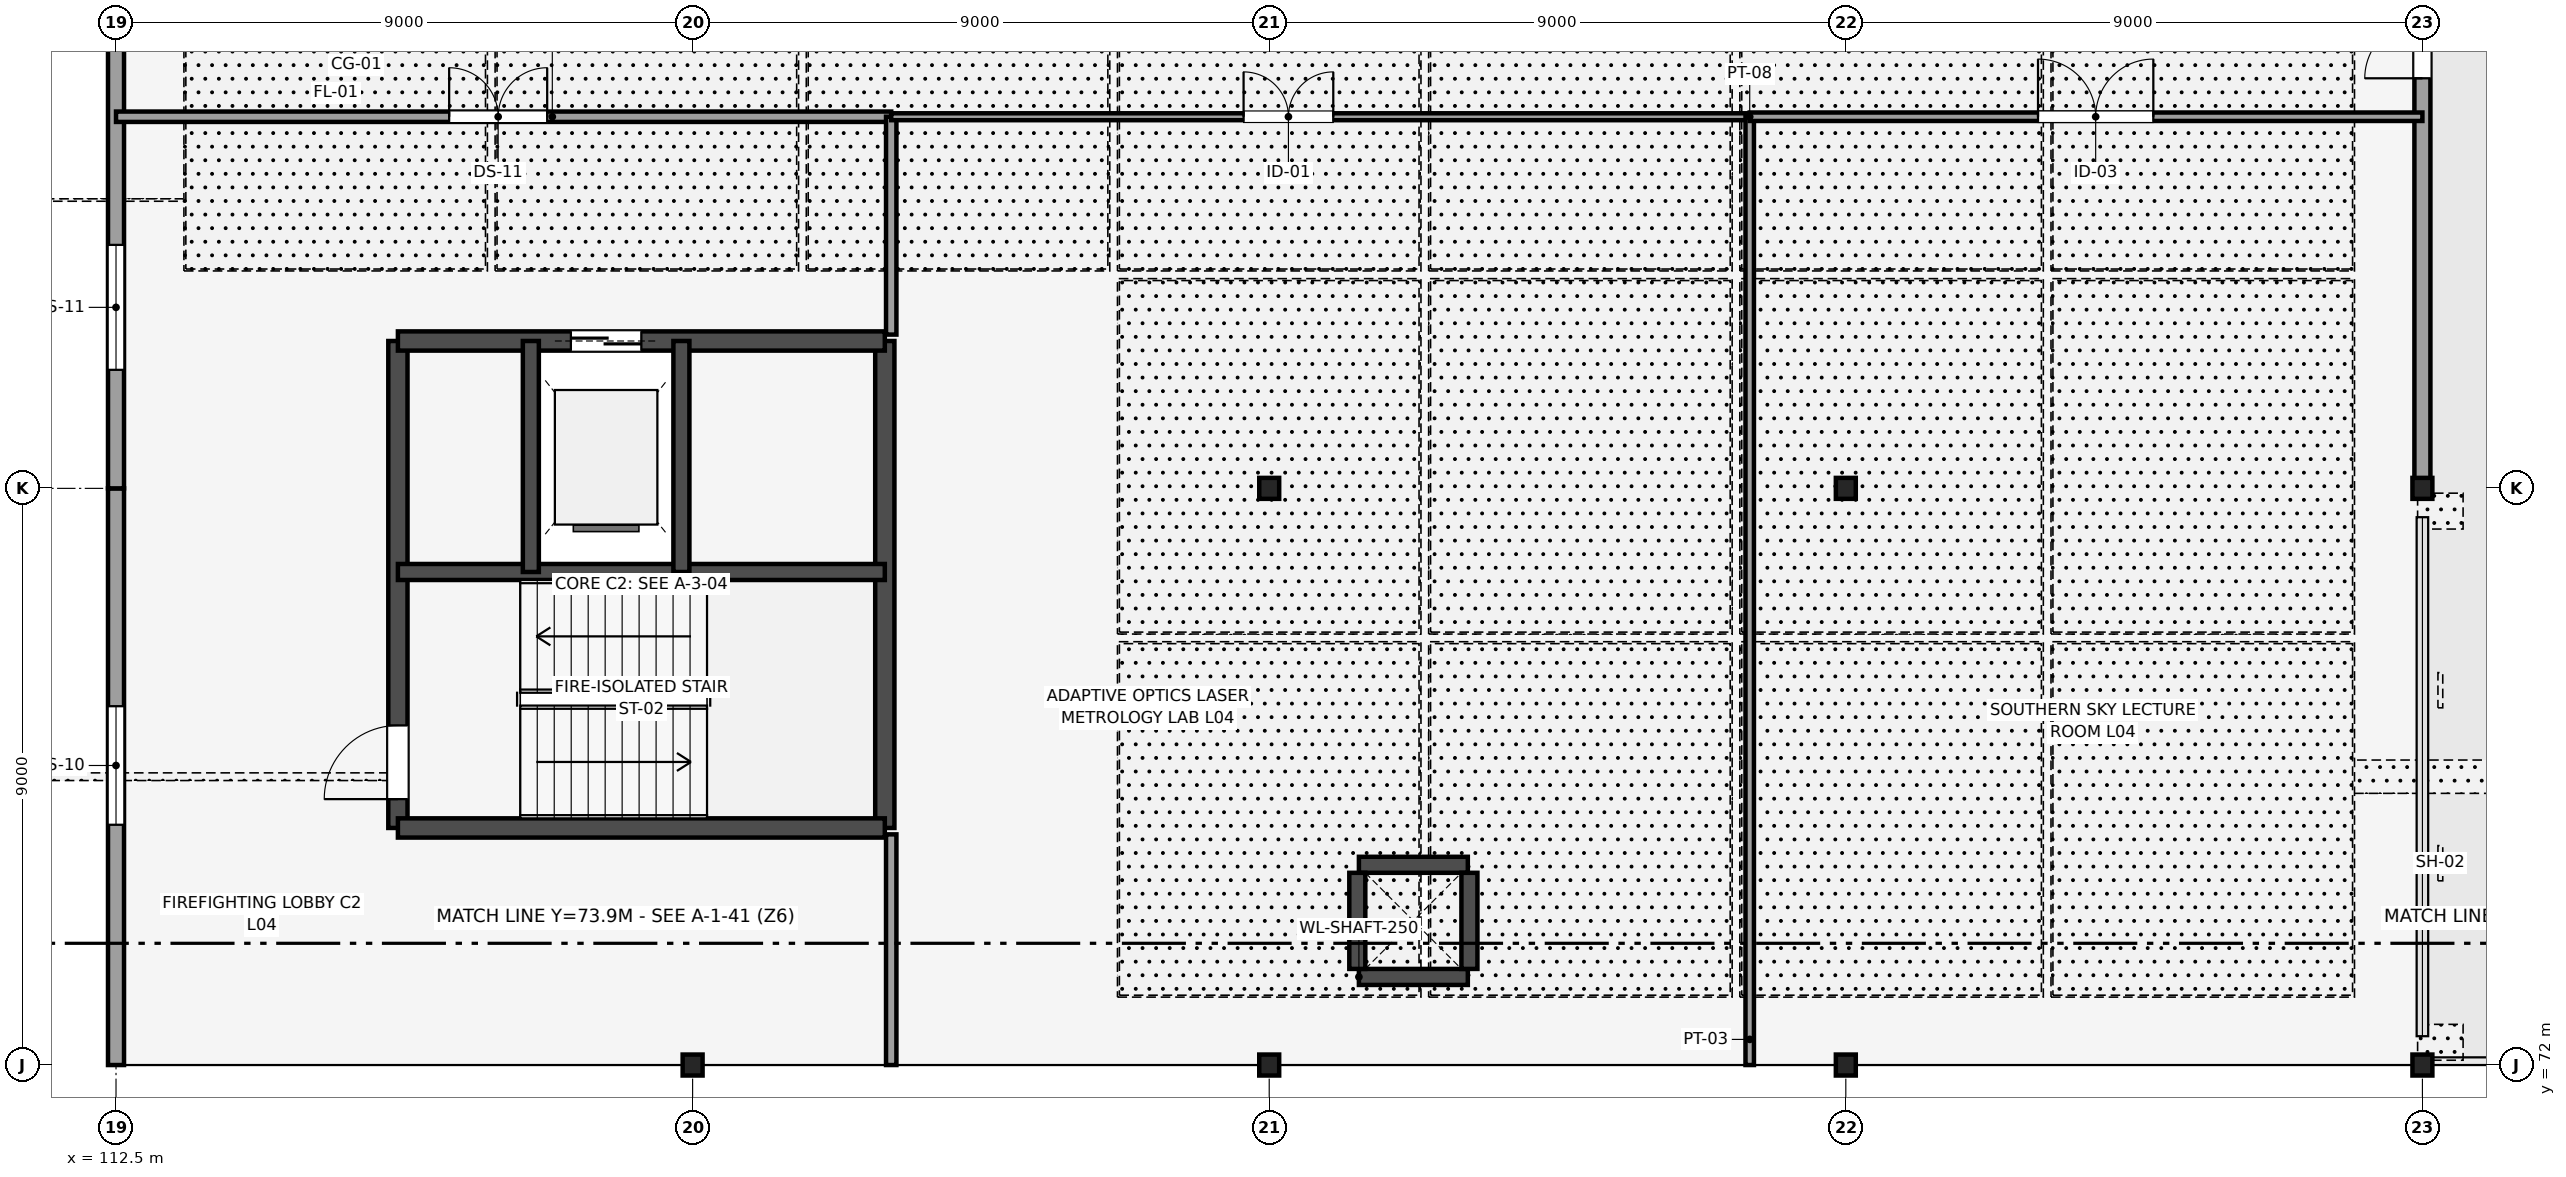
"""IFC4 building model, lengths in metres.
Left out: names, types, materials, properties, quantities, classifications, styles, units other than length and angle.
Written with IfcOpenShell. Run it as: python <this file> out.ifc"""

import sys

from ifc_helpers import new_model, si_unit, direction, frame, frame_2d, origin, origin_2d, place, context, subcontext, project, spatial, rectangle, i_section, extrude, element, fill, save


model = new_model("IFC4")
c1 = context("Model", 3, precision=1e-05, world=origin(), true_north=direction((0.0, 1.0)))
c2 = subcontext(c1, "Body", "Model", "MODEL_VIEW")
j1 = project(units=[si_unit("LENGTHUNIT", "METRE"), si_unit("PLANEANGLEUNIT", "RADIAN")], contexts=[c1])
p1 = place(None, origin())
s1 = spatial("IfcSite", under=j1, at=p1, CompositionType="ELEMENT")
p2 = place(p1, origin())
s2 = spatial("IfcBuilding", under=s1, at=p2, CompositionType="ELEMENT")
p3 = place(p2, frame((0.0, 0.0, 18.9)))
s3 = spatial("IfcBuildingStorey", under=s2, at=p3, CompositionType="ELEMENT", Elevation=18.9)
for number, where, z_axis, x_axis in (
    (1, (121.5, 72.0, 0.0), (0.0, 0.0, 1.0), (1.0, 0.0, 0.0)),
    (2, (130.5, 72.0, 0.0), (0.0, 0.0, 1.0), (1.0, 0.0, 0.0)),
    (3, (130.5, 81.0, 0.0), (0.0, 0.0, 1.0), (1.0, 0.0, 0.0)),
    (4, (139.5, 72.0, 0.0), (0.0, 0.0, 1.0), (1.0, 0.0, 0.0)),
    (5, (139.5, 81.0, 0.0), (0.0, 0.0, 1.0), (1.0, 0.0, 0.0)),
    (6, (148.5, 72.0, 0.0), (0.0, 0.0, 1.0), (1.0, 0.0, 0.0)),
    (7, (148.5, 81.0, 0.0), (0.0, 0.0, 1.0), (1.0, 0.0, 0.0)),
):
    element("IfcColumn", number, at=place(p3, frame(where, z_axis=z_axis, x_axis=x_axis)), inside=s3, PredefinedType="COLUMN", context=c2, shape_type="SweptSolid", body=[
        extrude(i_section(OverallWidth=0.311, OverallDepth=0.327, WebThickness=0.016, FlangeThickness=0.025, FilletRadius=0.017, at=origin_2d()), origin(), (0.0, 0.0, 1.0), 4.5),
    ])
p4 = place(p3, frame((116.9, 75.7, 0.0), z_axis=(0.0, 0.0, 1.0), x_axis=(0.0, 1.0, 0.0)))
e8 = element("IfcWall", 8, at=p4, inside=s3, PredefinedType="SHEAR", context=c2, shape_type="SweptSolid", body=[
    extrude(rectangle(XDim=7.6, YDim=0.3, at=frame_2d((3.8, 0.0))), origin(), (0.0, 0.0, 1.0), 4.5),
])
p5 = place(p4, frame((0.45, 0.0, 0.0)))
e9 = element("IfcOpeningElement", 9, at=p5, cuts=e8, PredefinedType="OPENING", context=c2, shape_type="SweptSolid", body=[
    extrude(rectangle(XDim=1.15, YDim=2.15, at=frame_2d((0.575, 1.075))), frame((0.0, 0.16, 0.0), z_axis=(0.0, -1.0, 0.0), x_axis=(1.0, 0.0, 0.0)), (0.0, 0.0, 1.0), 0.32),
])
for number, where, z_axis, x_axis in (
    (10, (124.5, 75.7, 0.0), (0.0, 0.0, 1.0), (0.0, 1.0, 0.0)),
    (11, (116.9, 75.7, 0.0), (0.0, 0.0, 1.0), (1.0, 0.0, 0.0)),
):
    element("IfcWall", number, at=place(p3, frame(where, z_axis=z_axis, x_axis=x_axis)), inside=s3, PredefinedType="SHEAR", context=c2, shape_type="SweptSolid", body=[
        extrude(rectangle(XDim=7.6, YDim=0.3, at=frame_2d((3.8, 0.0))), origin(), (0.0, 0.0, 1.0), 4.5),
    ])
p6 = place(p3, frame((116.9, 83.3, 0.0), z_axis=(0.0, 0.0, 1.0), x_axis=(1.0, 0.0, 0.0)))
e12 = element("IfcWall", 12, at=p6, inside=s3, PredefinedType="SHEAR", context=c2, shape_type="SweptSolid", body=[
    extrude(rectangle(XDim=7.6, YDim=0.3, at=frame_2d((3.8, 0.0))), origin(), (0.0, 0.0, 1.0), 4.5),
])
p7 = place(p6, frame((2.7, 0.0, 0.0)))
e13 = element("IfcOpeningElement", 13, at=p7, cuts=e12, PredefinedType="OPENING", context=c2, shape_type="SweptSolid", body=[
    extrude(rectangle(XDim=1.1, YDim=2.2, at=frame_2d((0.55, 1.1))), frame((0.0, 0.16, 0.0), z_axis=(0.0, -1.0, 0.0), x_axis=(1.0, 0.0, 0.0)), (0.0, 0.0, 1.0), 0.32),
])
p8 = place(p3, frame((116.9, 79.695, 0.0), z_axis=(0.0, 0.0, 1.0), x_axis=(1.0, 0.0, 0.0)))
e14 = element("IfcWall", 14, at=p8, inside=s3, PredefinedType="SHEAR", context=c2, shape_type="SweptSolid", body=[
    extrude(rectangle(XDim=7.6, YDim=0.25, at=frame_2d((3.8, 0.0))), origin(), (0.0, 0.0, 1.0), 4.5),
])
for number, where, z_axis, x_axis in (
    (15, (118.975, 79.695, 0.0), (0.0, 0.0, 1.0), (0.0, 1.0, 0.0)),
    (16, (121.325, 79.695, 0.0), (0.0, 0.0, 1.0), (0.0, 1.0, 0.0)),
):
    element("IfcWall", number, at=place(p3, frame(where, z_axis=z_axis, x_axis=x_axis)), inside=s3, PredefinedType="SHEAR", context=c2, shape_type="SweptSolid", body=[
        extrude(rectangle(XDim=3.605, YDim=0.25, at=frame_2d((1.802, 0.0))), origin(), (0.0, 0.0, 1.0), 4.5),
    ])
for number, where, z_axis, x_axis in (
    (17, (131.9, 73.375, 0.0), (0.0, 0.0, 1.0), (1.0, 0.0, 0.0)),
    (18, (131.9, 75.125, 0.0), (0.0, 0.0, 1.0), (1.0, 0.0, 0.0)),
):
    element("IfcWall", number, at=place(p3, frame(where, z_axis=z_axis, x_axis=x_axis)), inside=s3, PredefinedType="SHEAR", context=c2, shape_type="SweptSolid", body=[
        extrude(rectangle(XDim=1.7, YDim=0.25, at=frame_2d((0.85, 0.0))), origin(), (0.0, 0.0, 1.0), 3.77),
    ])
for number, where, z_axis, x_axis in (
    (19, (131.875, 73.5, 0.0), (0.0, 0.0, 1.0), (0.0, 1.0, 0.0)),
    (20, (133.625, 73.5, 0.0), (0.0, 0.0, 1.0), (0.0, 1.0, 0.0)),
):
    element("IfcWall", number, at=place(p3, frame(where, z_axis=z_axis, x_axis=x_axis)), inside=s3, PredefinedType="SHEAR", context=c2, shape_type="SweptSolid", body=[
        extrude(rectangle(XDim=1.5, YDim=0.25, at=frame_2d((0.75, 0.0))), origin(), (0.0, 0.0, 1.0), 3.77),
    ])
p9 = place(p3, frame((112.5, 81.0, 0.0), z_axis=(0.0, 0.0, 1.0), x_axis=(0.0, -1.0, 0.0)))
e21 = element("IfcWall", 21, at=p9, inside=s3, PredefinedType="STANDARD", context=c2, shape_type="SweptSolid", body=[
    extrude(rectangle(XDim=9.0, YDim=0.25, at=frame_2d((4.5, 0.0))), origin(), (0.0, 0.0, 1.0), 4.32),
])
p10 = place(p9, frame((3.4, 0.0, 1.0)))
e22 = element("IfcOpeningElement", 22, at=p10, cuts=e21, PredefinedType="OPENING", context=c2, shape_type="SweptSolid", body=[
    extrude(rectangle(XDim=1.85, YDim=1.65, at=frame_2d((0.925, 0.825))), frame((0.0, 0.135, 0.0), z_axis=(0.0, -1.0, 0.0), x_axis=(1.0, 0.0, 0.0)), (0.0, 0.0, 1.0), 0.27),
])
p11 = place(p3, frame((148.5, 81.0, 0.0), z_axis=(0.0, 0.0, 1.0), x_axis=(0.0, 1.0, 0.0)))
e23 = element("IfcWall", 23, at=p11, inside=s3, PredefinedType="STANDARD", context=c2, shape_type="SweptSolid", body=[
    extrude(rectangle(XDim=9.0, YDim=0.25, at=frame_2d((4.5, 0.0))), origin(), (0.0, 0.0, 1.0), 3.846),
])
p12 = place(p11, frame((6.4, 0.0, 0.0)))
e24 = element("IfcOpeningElement", 24, at=p12, cuts=e23, PredefinedType="OPENING", context=c2, shape_type="SweptSolid", body=[
    extrude(rectangle(XDim=1.8, YDim=2.3, at=frame_2d((0.9, 1.15))), frame((0.0, 0.135, 0.0), z_axis=(0.0, -1.0, 0.0), x_axis=(1.0, 0.0, 0.0)), (0.0, 0.0, 1.0), 0.27),
])
p13 = place(p3, frame((112.5, 90.0, 0.0), z_axis=(0.0, 0.0, 1.0), x_axis=(0.0, -1.0, 0.0)))
e25 = element("IfcWall", 25, at=p13, inside=s3, PredefinedType="STANDARD", context=c2, shape_type="SweptSolid", body=[
    extrude(rectangle(XDim=9.0, YDim=0.25, at=frame_2d((4.5, 0.0))), origin(), (0.0, 0.0, 1.0), 4.32),
])
p14 = place(p13, frame((5.2, 0.0, 1.0)))
e26 = element("IfcOpeningElement", 26, at=p14, cuts=e25, PredefinedType="OPENING", context=c2, shape_type="SweptSolid", body=[
    extrude(rectangle(XDim=1.95, YDim=1.65, at=frame_2d((0.975, 0.825))), frame((0.0, 0.135, 0.0), z_axis=(0.0, -1.0, 0.0), x_axis=(1.0, 0.0, 0.0)), (0.0, 0.0, 1.0), 0.27),
])
p15 = place(p3, frame((112.5, 86.8, 0.0), z_axis=(0.0, 0.0, 1.0), x_axis=(1.0, 0.0, 0.0)))
e27 = element("IfcWall", 27, at=p15, inside=s3, PredefinedType="PARTITIONING", context=c2, shape_type="SweptSolid", body=[
    extrude(rectangle(XDim=12.1, YDim=0.162, at=frame_2d((6.05, 0.0))), origin(), (0.0, 0.0, 1.0), 4.32),
])
p16 = place(p15, frame((5.2, 0.0, 0.0)))
e28 = element("IfcOpeningElement", 28, at=p16, cuts=e27, PredefinedType="OPENING", context=c2, shape_type="SweptSolid", body=[
    extrude(rectangle(XDim=1.53, YDim=2.175, at=frame_2d((0.765, 1.087))), frame((0.0, 0.091, 0.0), z_axis=(0.0, -1.0, 0.0), x_axis=(1.0, 0.0, 0.0)), (0.0, 0.0, 1.0), 0.182),
])
p17 = place(p3, frame((124.6, 83.4, 0.0), z_axis=(0.0, 0.0, 1.0), x_axis=(0.0, 1.0, 0.0)))
e29 = element("IfcWall", 29, at=p17, inside=s3, PredefinedType="PARTITIONING", context=c2, shape_type="SweptSolid", body=[
    extrude(rectangle(XDim=3.4, YDim=0.162, at=frame_2d((1.7, 0.0))), origin(), (0.0, 0.0, 1.0), 4.32),
])
p18 = place(p3, frame((124.6, 72.0, 0.0), z_axis=(0.0, 0.0, 1.0), x_axis=(0.0, 1.0, 0.0)))
e30 = element("IfcWall", 30, at=p18, inside=s3, PredefinedType="PARTITIONING", context=c2, shape_type="SweptSolid", body=[
    extrude(rectangle(XDim=3.6, YDim=0.162, at=frame_2d((1.8, 0.0))), origin(), (0.0, 0.0, 1.0), 4.32),
])
p19 = place(p3, frame((124.6, 86.8, 0.0), z_axis=(0.0, 0.0, 1.0), x_axis=(1.0, 0.0, 0.0)))
e31 = element("IfcWall", 31, at=p19, inside=s3, PredefinedType="PARTITIONING", context=c2, shape_type="SweptSolid", body=[
    extrude(rectangle(XDim=13.4, YDim=0.108, at=frame_2d((6.7, 0.0))), origin(), (0.0, 0.0, 1.0), 4.32),
])
p20 = place(p19, frame((5.5, 0.0, 0.0)))
e32 = element("IfcOpeningElement", 32, at=p20, cuts=e31, PredefinedType="OPENING", context=c2, shape_type="SweptSolid", body=[
    extrude(rectangle(XDim=1.4, YDim=2.2, at=frame_2d((0.7, 1.1))), frame((0.0, 0.064, 0.0), z_axis=(0.0, -1.0, 0.0), x_axis=(1.0, 0.0, 0.0)), (0.0, 0.0, 1.0), 0.128),
])
p21 = place(p3, frame((138.0, 72.0, 0.0), z_axis=(0.0, 0.0, 1.0), x_axis=(0.0, 1.0, 0.0)))
e33 = element("IfcWall", 33, at=p21, inside=s3, PredefinedType="PARTITIONING", context=c2, shape_type="SweptSolid", body=[
    extrude(rectangle(XDim=14.8, YDim=0.132, at=frame_2d((7.4, 0.0))), origin(), (0.0, 0.0, 1.0), 4.32),
])
p22 = place(p3, frame((138.0, 86.8, 0.0), z_axis=(0.0, 0.0, 1.0), x_axis=(1.0, 0.0, 0.0)))
e34 = element("IfcWall", 34, at=p22, inside=s3, PredefinedType="PARTITIONING", context=c2, shape_type="SweptSolid", body=[
    extrude(rectangle(XDim=10.5, YDim=0.132, at=frame_2d((5.25, 0.0))), origin(), (0.0, 0.0, 1.0), 4.32),
])
p23 = place(p22, frame((4.5, 0.0, 0.0)))
e35 = element("IfcOpeningElement", 35, at=p23, cuts=e34, PredefinedType="OPENING", context=c2, shape_type="SweptSolid", body=[
    extrude(rectangle(XDim=1.8, YDim=2.3, at=frame_2d((0.9, 1.15))), frame((0.0, 0.076, 0.0), z_axis=(0.0, -1.0, 0.0), x_axis=(1.0, 0.0, 0.0)), (0.0, 0.0, 1.0), 0.152),
])
p24 = place(p12, origin())
e36 = element("IfcDoor", 36, at=p24, inside=s3, OperationType="DOUBLE_DOOR_SINGLE_SWING", PredefinedType="DOOR", context=c2, shape_type="SweptSolid", body=[
    extrude(rectangle(XDim=1.8, YDim=2.3, at=frame_2d((0.9, 1.15))), frame((0.0, 0.025, 0.0), z_axis=(0.0, -1.0, 0.0), x_axis=(1.0, 0.0, 0.0)), (0.0, 0.0, 1.0), 0.05),
])
fill(e24, e36)
p25 = place(p10, origin())
e37 = element("IfcWindow", 37, at=p25, inside=s3, PartitioningType="SINGLE_PANEL", PredefinedType="WINDOW", context=c2, shape_type="SweptSolid", body=[
    extrude(rectangle(XDim=1.85, YDim=1.65, at=frame_2d((0.925, 0.825))), frame((0.0, 0.03, 0.0), z_axis=(0.0, -1.0, 0.0), x_axis=(1.0, 0.0, 0.0)), (0.0, 0.0, 1.0), 0.06),
])
fill(e22, e37)
p26 = place(p14, origin())
e38 = element("IfcWindow", 38, at=p26, inside=s3, PartitioningType="SINGLE_PANEL", PredefinedType="WINDOW", context=c2, shape_type="SweptSolid", body=[
    extrude(rectangle(XDim=1.95, YDim=1.65, at=frame_2d((0.975, 0.825))), frame((0.0, 0.03, 0.0), z_axis=(0.0, -1.0, 0.0), x_axis=(1.0, 0.0, 0.0)), (0.0, 0.0, 1.0), 0.06),
])
fill(e26, e38)
p27 = place(p5, origin())
e39 = element("IfcDoor", 39, at=p27, inside=s3, OperationType="SINGLE_SWING_LEFT", PredefinedType="DOOR", context=c2, shape_type="SweptSolid", body=[
    extrude(rectangle(XDim=1.15, YDim=2.15, at=frame_2d((0.575, 1.075))), frame((0.0, 0.025, 0.0), z_axis=(0.0, -1.0, 0.0), x_axis=(1.0, 0.0, 0.0)), (0.0, 0.0, 1.0), 0.05),
])
fill(e9, e39)
p28 = place(p7, origin())
e40 = element("IfcDoor", 40, at=p28, inside=s3, OperationType="DOUBLE_DOOR_SLIDING", PredefinedType="DOOR", context=c2, shape_type="SweptSolid", body=[
    extrude(rectangle(XDim=1.1, YDim=2.2, at=frame_2d((0.55, 1.1))), frame((0.0, 0.025, 0.0), z_axis=(0.0, -1.0, 0.0), x_axis=(1.0, 0.0, 0.0)), (0.0, 0.0, 1.0), 0.05),
])
fill(e13, e40)
p29 = place(p16, origin())
e41 = element("IfcDoor", 41, at=p29, inside=s3, OperationType="DOUBLE_DOOR_SINGLE_SWING", PredefinedType="DOOR", context=c2, shape_type="SweptSolid", body=[
    extrude(rectangle(XDim=1.53, YDim=2.175, at=frame_2d((0.765, 1.087))), frame((0.0, 0.025, 0.0), z_axis=(0.0, -1.0, 0.0), x_axis=(1.0, 0.0, 0.0)), (0.0, 0.0, 1.0), 0.05),
])
fill(e28, e41)
p30 = place(p20, origin())
e42 = element("IfcDoor", 42, at=p30, inside=s3, OperationType="DOUBLE_DOOR_SINGLE_SWING", PredefinedType="DOOR", context=c2, shape_type="SweptSolid", body=[
    extrude(rectangle(XDim=1.4, YDim=2.2, at=frame_2d((0.7, 1.1))), frame((0.0, 0.025, 0.0), z_axis=(0.0, -1.0, 0.0), x_axis=(1.0, 0.0, 0.0)), (0.0, 0.0, 1.0), 0.05),
])
fill(e32, e42)
p31 = place(p23, origin())
e43 = element("IfcDoor", 43, at=p31, inside=s3, OperationType="DOUBLE_DOOR_SINGLE_SWING", PredefinedType="DOOR", context=c2, shape_type="SweptSolid", body=[
    extrude(rectangle(XDim=1.8, YDim=2.3, at=frame_2d((0.9, 1.15))), frame((0.0, 0.025, 0.0), z_axis=(0.0, -1.0, 0.0), x_axis=(1.0, 0.0, 0.0)), (0.0, 0.0, 1.0), 0.05),
])
fill(e35, e43)
save(model, sys.argv[1])
